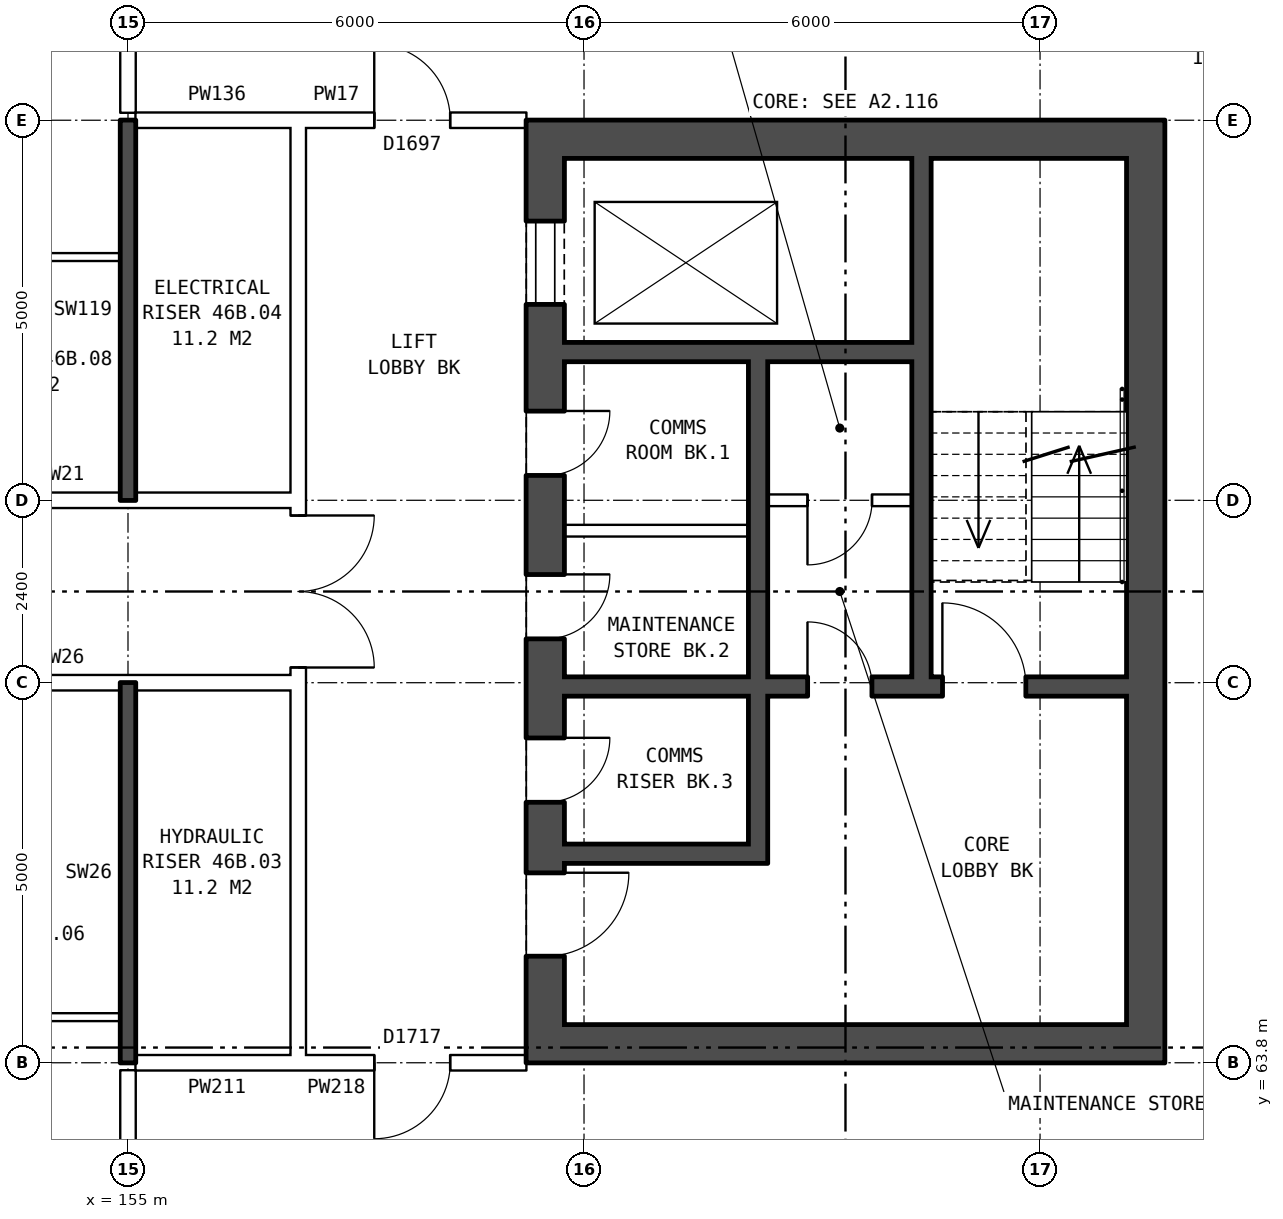
"""IFC4 building model, lengths in metres.
Left out: names, types, materials, properties, quantities, classifications, styles, units other than length and angle.
Written with IfcOpenShell. Run it as: python <this file> out.ifc"""

import sys

from ifc_helpers import new_model, si_unit, direction, frame, frame_2d, origin, place, context, subcontext, project, spatial, rectangle, extrude, element, fill, save


model = new_model("IFC4")
c1 = context("Model", 3, precision=1e-05, world=origin(), true_north=direction((0.0, 1.0)))
c2 = subcontext(c1, "Body", "Model", "MODEL_VIEW")
j1 = project(units=[si_unit("LENGTHUNIT", "METRE"), si_unit("PLANEANGLEUNIT", "RADIAN")], contexts=[c1])
p1 = place(None, origin())
s1 = spatial("IfcSite", under=j1, at=p1, CompositionType="ELEMENT")
p2 = place(p1, origin())
s2 = spatial("IfcBuilding", under=s1, at=p2, CompositionType="ELEMENT")
p3 = place(p2, frame((0.0, 0.0, 164.0)))
s3 = spatial("IfcBuildingStorey", under=s2, at=p3, CompositionType="ELEMENT", Elevation=164.0)
p4 = place(p3, frame((160.49, 76.2, 0.0), z_axis=(0.0, 0.0, 1.0), x_axis=(0.0, -1.0, 0.0)))
e1 = element("IfcWall", 1, at=p4, inside=s3, PredefinedType="SHEAR", context=c2, shape_type="SweptSolid", body=[
    extrude(rectangle(XDim=12.4, YDim=0.5, at=frame_2d((6.2, 0.0))), origin(), (0.0, 0.0, 1.0), 2.85),
])
p5 = place(p4, frame((1.325, 0.0, 0.0)))
e2 = element("IfcOpeningElement", 2, at=p5, cuts=e1, PredefinedType="OPENING", context=c2, shape_type="SweptSolid", body=[
    extrude(rectangle(XDim=1.1, YDim=2.1, at=frame_2d((0.55, 1.05))), frame((0.0, 0.26, 0.0), z_axis=(0.0, -1.0, 0.0), x_axis=(1.0, 0.0, 0.0)), (0.0, 0.0, 1.0), 0.52),
])
p6 = place(p4, frame((3.825, 0.0, 0.0)))
e3 = element("IfcOpeningElement", 3, at=p6, cuts=e1, PredefinedType="OPENING", context=c2, shape_type="SweptSolid", body=[
    extrude(rectangle(XDim=0.85, YDim=2.1, at=frame_2d((0.425, 1.05))), frame((0.0, 0.26, 0.0), z_axis=(0.0, -1.0, 0.0), x_axis=(1.0, 0.0, 0.0)), (0.0, 0.0, 1.0), 0.52),
])
p7 = place(p4, frame((5.975, 0.0, 0.0)))
e4 = element("IfcOpeningElement", 4, at=p7, cuts=e1, PredefinedType="OPENING", context=c2, shape_type="SweptSolid", body=[
    extrude(rectangle(XDim=0.85, YDim=2.1, at=frame_2d((0.425, 1.05))), frame((0.0, 0.26, 0.0), z_axis=(0.0, -1.0, 0.0), x_axis=(1.0, 0.0, 0.0)), (0.0, 0.0, 1.0), 0.52),
])
p8 = place(p4, frame((9.9, 0.0, 0.0)))
e5 = element("IfcOpeningElement", 5, at=p8, cuts=e1, PredefinedType="OPENING", context=c2, shape_type="SweptSolid", body=[
    extrude(rectangle(XDim=1.1, YDim=2.1, at=frame_2d((0.55, 1.05))), frame((0.0, 0.26, 0.0), z_axis=(0.0, -1.0, 0.0), x_axis=(1.0, 0.0, 0.0)), (0.0, 0.0, 1.0), 0.52),
])
p9 = place(p4, frame((8.125, 0.0, 0.0)))
e6 = element("IfcOpeningElement", 6, at=p9, cuts=e1, PredefinedType="OPENING", context=c2, shape_type="SweptSolid", body=[
    extrude(rectangle(XDim=0.85, YDim=2.1, at=frame_2d((0.425, 1.05))), frame((0.0, 0.26, 0.0), z_axis=(0.0, -1.0, 0.0), x_axis=(1.0, 0.0, 0.0)), (0.0, 0.0, 1.0), 0.52),
])
p10 = place(p3, frame((168.39, 76.2, 0.0), z_axis=(0.0, 0.0, 1.0), x_axis=(0.0, -1.0, 0.0)))
e7 = element("IfcWall", 7, at=p10, inside=s3, PredefinedType="SHEAR", context=c2, shape_type="SweptSolid", body=[
    extrude(rectangle(XDim=12.4, YDim=0.5, at=frame_2d((6.2, 0.0))), origin(), (0.0, 0.0, 1.0), 2.85),
])
for number, where, z_axis, x_axis in (
    (8, (160.74, 75.95, 0.0), (0.0, 0.0, 1.0), (1.0, 0.0, 0.0)),
    (9, (160.74, 64.05, 0.0), (0.0, 0.0, 1.0), (1.0, 0.0, 0.0)),
):
    element("IfcWall", number, at=place(p3, frame(where, z_axis=z_axis, x_axis=x_axis)), inside=s3, PredefinedType="SHEAR", context=c2, shape_type="SweptSolid", body=[
        extrude(rectangle(XDim=7.4, YDim=0.5, at=frame_2d((3.7, 0.0))), origin(), (0.0, 0.0, 1.0), 2.85),
    ])
p11 = place(p3, frame((160.74, 73.15, 0.0), z_axis=(0.0, 0.0, 1.0), x_axis=(1.0, 0.0, 0.0)))
e10 = element("IfcWall", 10, at=p11, inside=s3, PredefinedType="SHEAR", context=c2, shape_type="SweptSolid", body=[
    extrude(rectangle(XDim=4.575, YDim=0.25, at=frame_2d((2.288, 0.0))), origin(), (0.0, 0.0, 1.0), 2.85),
])
p12 = place(p3, frame((163.415, 71.2, 0.0), z_axis=(0.0, 0.0, 1.0), x_axis=(1.0, 0.0, 0.0)))
e11 = element("IfcWall", 11, at=p12, inside=s3, PredefinedType="PARTITIONING", context=c2, shape_type="SweptSolid", body=[
    extrude(rectangle(XDim=1.9, YDim=0.15, at=frame_2d((0.95, 0.0))), origin(), (0.0, 0.0, 1.0), 2.85),
])
p13 = place(p12, frame((0.525, 0.0, 0.0)))
e12 = element("IfcOpeningElement", 12, at=p13, cuts=e11, PredefinedType="OPENING", context=c2, shape_type="SweptSolid", body=[
    extrude(rectangle(XDim=0.85, YDim=2.1, at=frame_2d((0.425, 1.05))), frame((0.0, 0.085, 0.0), z_axis=(0.0, -1.0, 0.0), x_axis=(1.0, 0.0, 0.0)), (0.0, 0.0, 1.0), 0.17),
])
p14 = place(p3, frame((160.74, 70.8, 0.0), z_axis=(0.0, 0.0, 1.0), x_axis=(1.0, 0.0, 0.0)))
e13 = element("IfcWall", 13, at=p14, inside=s3, PredefinedType="PARTITIONING", context=c2, shape_type="SweptSolid", body=[
    extrude(rectangle(XDim=2.425, YDim=0.15, at=frame_2d((1.212, 0.0))), origin(), (0.0, 0.0, 1.0), 2.85),
])
p15 = place(p3, frame((160.74, 68.75, 0.0), z_axis=(0.0, 0.0, 1.0), x_axis=(1.0, 0.0, 0.0)))
e14 = element("IfcWall", 14, at=p15, inside=s3, PredefinedType="SHEAR", context=c2, shape_type="SweptSolid", body=[
    extrude(rectangle(XDim=7.4, YDim=0.25, at=frame_2d((3.7, 0.0))), origin(), (0.0, 0.0, 1.0), 2.85),
])
p16 = place(p15, frame((4.975, 0.0, 0.0)))
e15 = element("IfcOpeningElement", 15, at=p16, cuts=e14, PredefinedType="OPENING", context=c2, shape_type="SweptSolid", body=[
    extrude(rectangle(XDim=1.1, YDim=2.1, at=frame_2d((0.55, 1.05))), frame((0.0, 0.135, 0.0), z_axis=(0.0, -1.0, 0.0), x_axis=(1.0, 0.0, 0.0)), (0.0, 0.0, 1.0), 0.27),
])
p17 = place(p15, frame((3.2, 0.0, 0.0)))
e16 = element("IfcOpeningElement", 16, at=p17, cuts=e14, PredefinedType="OPENING", context=c2, shape_type="SweptSolid", body=[
    extrude(rectangle(XDim=0.85, YDim=2.1, at=frame_2d((0.425, 1.05))), frame((0.0, 0.135, 0.0), z_axis=(0.0, -1.0, 0.0), x_axis=(1.0, 0.0, 0.0)), (0.0, 0.0, 1.0), 0.27),
])
p18 = place(p3, frame((160.74, 66.55, 0.0), z_axis=(0.0, 0.0, 1.0), x_axis=(1.0, 0.0, 0.0)))
e17 = element("IfcWall", 17, at=p18, inside=s3, PredefinedType="SHEAR", context=c2, shape_type="SweptSolid", body=[
    extrude(rectangle(XDim=2.425, YDim=0.25, at=frame_2d((1.212, 0.0))), origin(), (0.0, 0.0, 1.0), 2.85),
])
p19 = place(p3, frame((163.29, 73.025, 0.0), z_axis=(0.0, 0.0, 1.0), x_axis=(0.0, -1.0, 0.0)))
e18 = element("IfcWall", 18, at=p19, inside=s3, PredefinedType="SHEAR", context=c2, shape_type="SweptSolid", body=[
    extrude(rectangle(XDim=4.15, YDim=0.25, at=frame_2d((2.075, 0.0))), origin(), (0.0, 0.0, 1.0), 2.85),
])
p20 = place(p3, frame((163.29, 68.625, 0.0), z_axis=(0.0, 0.0, 1.0), x_axis=(0.0, -1.0, 0.0)))
e19 = element("IfcWall", 19, at=p20, inside=s3, PredefinedType="SHEAR", context=c2, shape_type="SweptSolid", body=[
    extrude(rectangle(XDim=2.2, YDim=0.25, at=frame_2d((1.1, 0.0))), origin(), (0.0, 0.0, 1.0), 2.85),
])
p21 = place(p3, frame((165.44, 75.7, 0.0), z_axis=(0.0, 0.0, 1.0), x_axis=(0.0, -1.0, 0.0)))
e20 = element("IfcWall", 20, at=p21, inside=s3, PredefinedType="SHEAR", context=c2, shape_type="SweptSolid", body=[
    extrude(rectangle(XDim=6.825, YDim=0.25, at=frame_2d((3.413, 0.0))), origin(), (0.0, 0.0, 1.0), 2.85),
])
p22 = place(p3, frame((157.24, 63.9, 0.0), z_axis=(0.0, 0.0, 1.0), x_axis=(0.0, 1.0, 0.0)))
e21 = element("IfcWall", 21, at=p22, inside=s3, PredefinedType="PARTITIONING", context=c2, shape_type="SweptSolid", body=[
    extrude(rectangle(XDim=12.2, YDim=0.2, at=frame_2d((6.1, 0.0))), origin(), (0.0, 0.0, 1.0), 2.85),
])
p23 = place(p22, frame((5.1, 0.0, 0.0)))
e22 = element("IfcOpeningElement", 22, at=p23, cuts=e21, PredefinedType="OPENING", context=c2, shape_type="SweptSolid", body=[
    extrude(rectangle(XDim=2.0, YDim=2.1, at=frame_2d((1.0, 1.05))), frame((0.0, 0.11, 0.0), z_axis=(0.0, -1.0, 0.0), x_axis=(1.0, 0.0, 0.0)), (0.0, 0.0, 1.0), 0.22),
])
p24 = place(p3, frame((155.1, 63.8, 0.0), z_axis=(0.0, 0.0, 1.0), x_axis=(1.0, 0.0, 0.0)))
e23 = element("IfcWall", 23, at=p24, inside=s3, PredefinedType="PARTITIONING", context=c2, shape_type="SweptSolid", body=[
    extrude(rectangle(XDim=2.14, YDim=0.2, at=frame_2d((1.07, 0.0))), origin(), (0.0, 0.0, 1.0), 2.85),
])
p25 = place(p3, frame((157.24, 63.8, 0.0), z_axis=(0.0, 0.0, 1.0), x_axis=(1.0, 0.0, 0.0)))
e24 = element("IfcWall", 24, at=p25, inside=s3, PredefinedType="PARTITIONING", context=c2, shape_type="SweptSolid", body=[
    extrude(rectangle(XDim=3.0, YDim=0.2, at=frame_2d((1.5, 0.0))), origin(), (0.0, 0.0, 1.0), 2.85),
])
p26 = place(p25, frame((1.0, 0.0, 0.0)))
e25 = element("IfcOpeningElement", 25, at=p26, cuts=e24, PredefinedType="OPENING", context=c2, shape_type="SweptSolid", body=[
    extrude(rectangle(XDim=1.0, YDim=2.1, at=frame_2d((0.5, 1.05))), frame((0.0, 0.11, 0.0), z_axis=(0.0, -1.0, 0.0), x_axis=(1.0, 0.0, 0.0)), (0.0, 0.0, 1.0), 0.22),
])
p27 = place(p3, frame((152.0, 64.4, 0.0), z_axis=(0.0, 0.0, 1.0), x_axis=(1.0, 0.0, 0.0)))
e26 = element("IfcWall", 26, at=p27, inside=s3, PredefinedType="PARTITIONING", context=c2, shape_type="SweptSolid", body=[
    extrude(rectangle(XDim=2.9, YDim=0.1, at=frame_2d((1.45, 0.0))), origin(), (0.0, 0.0, 1.0), 2.85),
])
p28 = place(p3, frame((142.76, 68.8, 0.0), z_axis=(0.0, 0.0, 1.0), x_axis=(1.0, 0.0, 0.0)))
e27 = element("IfcWall", 27, at=p28, inside=s3, PredefinedType="PARTITIONING", context=c2, shape_type="SweptSolid", body=[
    extrude(rectangle(XDim=14.48, YDim=0.2, at=frame_2d((7.24, 0.0))), origin(), (0.0, 0.0, 1.0), 2.85),
])
p29 = place(p28, frame((1.12, 0.0, 0.0)))
e28 = element("IfcOpeningElement", 28, at=p29, cuts=e27, PredefinedType="OPENING", context=c2, shape_type="SweptSolid", body=[
    extrude(rectangle(XDim=1.0, YDim=2.1, at=frame_2d((0.5, 1.05))), frame((0.0, 0.11, 0.0), z_axis=(0.0, -1.0, 0.0), x_axis=(1.0, 0.0, 0.0)), (0.0, 0.0, 1.0), 0.22),
])
p30 = place(p28, frame((7.24, 0.0, 0.0)))
e29 = element("IfcOpeningElement", 29, at=p30, cuts=e27, PredefinedType="OPENING", context=c2, shape_type="SweptSolid", body=[
    extrude(rectangle(XDim=1.0, YDim=2.1, at=frame_2d((0.5, 1.05))), frame((0.0, 0.11, 0.0), z_axis=(0.0, -1.0, 0.0), x_axis=(1.0, 0.0, 0.0)), (0.0, 0.0, 1.0), 0.22),
])
p31 = place(p3, frame((142.76, 71.2, 0.0), z_axis=(0.0, 0.0, 1.0), x_axis=(1.0, 0.0, 0.0)))
e30 = element("IfcWall", 30, at=p31, inside=s3, PredefinedType="PARTITIONING", context=c2, shape_type="SweptSolid", body=[
    extrude(rectangle(XDim=14.48, YDim=0.2, at=frame_2d((7.24, 0.0))), origin(), (0.0, 0.0, 1.0), 2.85),
])
p32 = place(p31, frame((4.24, 0.0, 0.0)))
e31 = element("IfcOpeningElement", 31, at=p32, cuts=e30, PredefinedType="OPENING", context=c2, shape_type="SweptSolid", body=[
    extrude(rectangle(XDim=1.0, YDim=2.1, at=frame_2d((0.5, 1.05))), frame((0.0, 0.11, 0.0), z_axis=(0.0, -1.0, 0.0), x_axis=(1.0, 0.0, 0.0)), (0.0, 0.0, 1.0), 0.22),
])
p33 = place(p31, frame((7.24, 0.0, 0.0)))
e32 = element("IfcOpeningElement", 32, at=p33, cuts=e30, PredefinedType="OPENING", context=c2, shape_type="SweptSolid", body=[
    extrude(rectangle(XDim=1.0, YDim=2.1, at=frame_2d((0.5, 1.05))), frame((0.0, 0.11, 0.0), z_axis=(0.0, -1.0, 0.0), x_axis=(1.0, 0.0, 0.0)), (0.0, 0.0, 1.0), 0.22),
])
p34 = place(p3, frame((152.0, 74.4, 0.0), z_axis=(0.0, 0.0, 1.0), x_axis=(1.0, 0.0, 0.0)))
e33 = element("IfcWall", 33, at=p34, inside=s3, PredefinedType="PARTITIONING", context=c2, shape_type="SweptSolid", body=[
    extrude(rectangle(XDim=2.9, YDim=0.1, at=frame_2d((1.45, 0.0))), origin(), (0.0, 0.0, 1.0), 2.85),
])
p35 = place(p3, frame((155.1, 76.2, 0.0), z_axis=(0.0, 0.0, 1.0), x_axis=(1.0, 0.0, 0.0)))
e34 = element("IfcWall", 34, at=p35, inside=s3, PredefinedType="PARTITIONING", context=c2, shape_type="SweptSolid", body=[
    extrude(rectangle(XDim=2.14, YDim=0.2, at=frame_2d((1.07, 0.0))), origin(), (0.0, 0.0, 1.0), 2.85),
])
p36 = place(p3, frame((157.24, 76.2, 0.0), z_axis=(0.0, 0.0, 1.0), x_axis=(1.0, 0.0, 0.0)))
e35 = element("IfcWall", 35, at=p36, inside=s3, PredefinedType="PARTITIONING", context=c2, shape_type="SweptSolid", body=[
    extrude(rectangle(XDim=3.0, YDim=0.2, at=frame_2d((1.5, 0.0))), origin(), (0.0, 0.0, 1.0), 2.85),
])
p37 = place(p36, frame((1.0, 0.0, 0.0)))
e36 = element("IfcOpeningElement", 36, at=p37, cuts=e35, PredefinedType="OPENING", context=c2, shape_type="SweptSolid", body=[
    extrude(rectangle(XDim=1.0, YDim=2.1, at=frame_2d((0.5, 1.05))), frame((0.0, 0.11, 0.0), z_axis=(0.0, -1.0, 0.0), x_axis=(1.0, 0.0, 0.0)), (0.0, 0.0, 1.0), 0.22),
])
p38 = place(p3, frame((155.0, 61.5, 0.0), z_axis=(0.0, 0.0, 1.0), x_axis=(0.0, 1.0, 0.0)))
e37 = element("IfcWall", 37, at=p38, inside=s3, PredefinedType="PARTITIONING", context=c2, shape_type="SweptSolid", body=[
    extrude(rectangle(XDim=2.2, YDim=0.2, at=frame_2d((1.1, 0.0))), origin(), (0.0, 0.0, 1.0), 2.85),
])
for number, where, z_axis, x_axis in (
    (38, (155.0, 63.8, 0.0), (0.0, 0.0, 1.0), (0.0, 1.0, 0.0)),
    (39, (155.0, 71.2, 0.0), (0.0, 0.0, 1.0), (0.0, 1.0, 0.0)),
):
    element("IfcWall", number, at=place(p3, frame(where, z_axis=z_axis, x_axis=x_axis)), inside=s3, PredefinedType="SOLIDWALL", context=c2, shape_type="SweptSolid", body=[
        extrude(rectangle(XDim=5.0, YDim=0.2, at=frame_2d((2.5, 0.0))), origin(), (0.0, 0.0, 1.0), 2.85),
    ])
p39 = place(p3, frame((155.0, 76.3, 0.0), z_axis=(0.0, 0.0, 1.0), x_axis=(0.0, 1.0, 0.0)))
e40 = element("IfcWall", 40, at=p39, inside=s3, PredefinedType="PARTITIONING", context=c2, shape_type="SweptSolid", body=[
    extrude(rectangle(XDim=2.2, YDim=0.2, at=frame_2d((1.1, 0.0))), origin(), (0.0, 0.0, 1.0), 2.85),
])
p40 = place(p5, origin())
e41 = element("IfcDoor", 41, at=p40, inside=s3, OperationType="DOUBLE_DOOR_SLIDING", PredefinedType="DOOR", context=c2, shape_type="SweptSolid", body=[
    extrude(rectangle(XDim=1.1, YDim=2.1, at=frame_2d((0.55, 1.05))), frame((0.0, 0.235, 0.0), z_axis=(0.0, -1.0, 0.0), x_axis=(1.0, 0.0, 0.0)), (0.0, 0.0, 1.0), 0.05),
])
fill(e2, e41)
p41 = place(p6, origin())
e42 = element("IfcDoor", 42, at=p41, inside=s3, OperationType="SINGLE_SWING_LEFT", PredefinedType="DOOR", context=c2, shape_type="SweptSolid", body=[
    extrude(rectangle(XDim=0.85, YDim=2.1, at=frame_2d((0.425, 1.05))), frame((0.0, 0.235, 0.0), z_axis=(0.0, -1.0, 0.0), x_axis=(1.0, 0.0, 0.0)), (0.0, 0.0, 1.0), 0.05),
])
fill(e3, e42)
p42 = place(p7, origin())
e43 = element("IfcDoor", 43, at=p42, inside=s3, OperationType="SINGLE_SWING_LEFT", PredefinedType="DOOR", context=c2, shape_type="SweptSolid", body=[
    extrude(rectangle(XDim=0.85, YDim=2.1, at=frame_2d((0.425, 1.05))), frame((0.0, 0.235, 0.0), z_axis=(0.0, -1.0, 0.0), x_axis=(1.0, 0.0, 0.0)), (0.0, 0.0, 1.0), 0.05),
])
fill(e4, e43)
p43 = place(p8, origin())
e44 = element("IfcDoor", 44, at=p43, inside=s3, OperationType="SINGLE_SWING_LEFT", PredefinedType="DOOR", context=c2, shape_type="SweptSolid", body=[
    extrude(rectangle(XDim=1.1, YDim=2.1, at=frame_2d((0.55, 1.05))), frame((0.0, 0.235, 0.0), z_axis=(0.0, -1.0, 0.0), x_axis=(1.0, 0.0, 0.0)), (0.0, 0.0, 1.0), 0.05),
])
fill(e5, e44)
p44 = place(p16, origin())
e45 = element("IfcDoor", 45, at=p44, inside=s3, OperationType="SINGLE_SWING_LEFT", PredefinedType="DOOR", context=c2, shape_type="SweptSolid", body=[
    extrude(rectangle(XDim=1.1, YDim=2.1, at=frame_2d((0.55, 1.05))), frame((0.0, 0.025, 0.0), z_axis=(0.0, -1.0, 0.0), x_axis=(1.0, 0.0, 0.0)), (0.0, 0.0, 1.0), 0.05),
])
fill(e15, e45)
p45 = place(p9, origin())
e46 = element("IfcDoor", 46, at=p45, inside=s3, OperationType="SINGLE_SWING_LEFT", PredefinedType="DOOR", context=c2, shape_type="SweptSolid", body=[
    extrude(rectangle(XDim=0.85, YDim=2.1, at=frame_2d((0.425, 1.05))), frame((0.0, 0.235, 0.0), z_axis=(0.0, -1.0, 0.0), x_axis=(1.0, 0.0, 0.0)), (0.0, 0.0, 1.0), 0.05),
])
fill(e6, e46)
p46 = place(p17, origin())
e47 = element("IfcDoor", 47, at=p46, inside=s3, OperationType="SINGLE_SWING_LEFT", PredefinedType="DOOR", context=c2, shape_type="SweptSolid", body=[
    extrude(rectangle(XDim=0.85, YDim=2.1, at=frame_2d((0.425, 1.05))), frame((0.0, 0.025, 0.0), z_axis=(0.0, -1.0, 0.0), x_axis=(1.0, 0.0, 0.0)), (0.0, 0.0, 1.0), 0.05),
])
fill(e16, e47)
p47 = place(p13, frame((0.85, 0.0, 0.0), z_axis=(0.0, 0.0, 1.0), x_axis=(-1.0, 0.0, 0.0)))
e48 = element("IfcDoor", 48, at=p47, inside=s3, OperationType="SINGLE_SWING_RIGHT", PredefinedType="DOOR", context=c2, shape_type="SweptSolid", body=[
    extrude(rectangle(XDim=0.85, YDim=2.1, at=frame_2d((0.425, 1.05))), frame((0.0, 0.025, 0.0), z_axis=(0.0, -1.0, 0.0), x_axis=(1.0, 0.0, 0.0)), (0.0, 0.0, 1.0), 0.05),
])
fill(e12, e48)
p48 = place(p23, frame((2.0, 0.0, 0.0), z_axis=(0.0, 0.0, 1.0), x_axis=(-1.0, 0.0, 0.0)))
e49 = element("IfcDoor", 49, at=p48, inside=s3, OperationType="DOUBLE_DOOR_SINGLE_SWING", PredefinedType="DOOR", context=c2, shape_type="SweptSolid", body=[
    extrude(rectangle(XDim=2.0, YDim=2.1, at=frame_2d((1.0, 1.05))), frame((0.0, 0.025, 0.0), z_axis=(0.0, -1.0, 0.0), x_axis=(1.0, 0.0, 0.0)), (0.0, 0.0, 1.0), 0.05),
])
fill(e22, e49)
p49 = place(p26, frame((1.0, 0.0, 0.0), z_axis=(0.0, 0.0, 1.0), x_axis=(-1.0, 0.0, 0.0)))
e50 = element("IfcDoor", 50, at=p49, inside=s3, OperationType="SINGLE_SWING_RIGHT", PredefinedType="DOOR", context=c2, shape_type="SweptSolid", body=[
    extrude(rectangle(XDim=1.0, YDim=2.1, at=frame_2d((0.5, 1.05))), frame((0.0, 0.025, 0.0), z_axis=(0.0, -1.0, 0.0), x_axis=(1.0, 0.0, 0.0)), (0.0, 0.0, 1.0), 0.05),
])
fill(e25, e50)
p50 = place(p37, origin())
e51 = element("IfcDoor", 51, at=p50, inside=s3, OperationType="SINGLE_SWING_LEFT", PredefinedType="DOOR", context=c2, shape_type="SweptSolid", body=[
    extrude(rectangle(XDim=1.0, YDim=2.1, at=frame_2d((0.5, 1.05))), frame((0.0, 0.025, 0.0), z_axis=(0.0, -1.0, 0.0), x_axis=(1.0, 0.0, 0.0)), (0.0, 0.0, 1.0), 0.05),
])
fill(e36, e51)
save(model, sys.argv[1])
